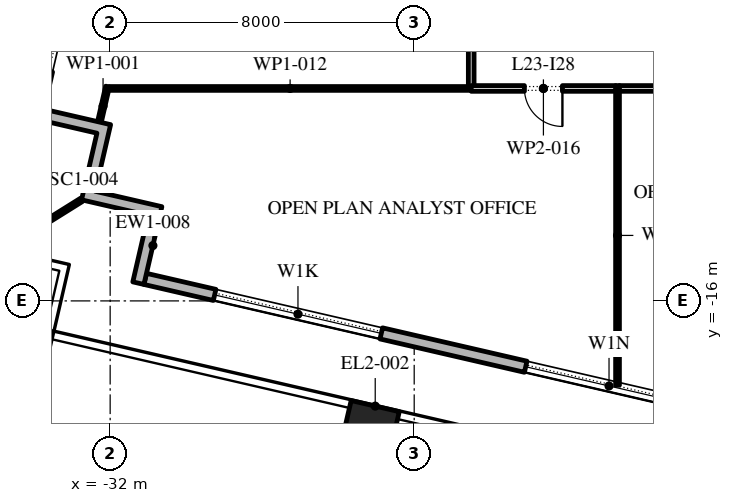
"""IFC4 building model, lengths in metres.
Left out: names, types, materials, properties, quantities, classifications, styles, units other than length and angle.
Written with IfcOpenShell. Run it as: python <this file> out.ifc"""

import sys

from ifc_helpers import new_model, si_unit, direction, frame, frame_2d, origin, origin_2d, place, context, subcontext, project, spatial, polyline, rectangle, outline, extrude, element, fill, save


model = new_model("IFC4")
c1 = context("Model", 3, precision=1e-05, world=origin(), true_north=direction((0.0, 1.0)))
c2 = subcontext(c1, "Body", "Model", "MODEL_VIEW")
j1 = project(units=[si_unit("LENGTHUNIT", "METRE"), si_unit("PLANEANGLEUNIT", "RADIAN")], contexts=[c1])
p1 = place(None, origin())
s1 = spatial("IfcSite", under=j1, at=p1, CompositionType="ELEMENT")
p2 = place(p1, origin())
s2 = spatial("IfcBuilding", under=s1, at=p2, CompositionType="ELEMENT")
p3 = place(p2, frame((0.0, 0.0, 109.8)))
s3 = spatial("IfcBuildingStorey", under=s2, at=p3, CompositionType="ELEMENT", Elevation=109.8)
for number, where, z_axis, x_axis in (
    (1, (-34.282, -17.298, 0.0), (0.0, 0.0, 1.0), (0.974, -0.225, 0.0)),
    (2, (-25.172, -19.402, 0.0), (0.0, 0.0, 1.0), (0.974, -0.225, 0.0)),
):
    element("IfcColumn", number, at=place(p3, frame(where, z_axis=z_axis, x_axis=x_axis)), inside=s3, PredefinedType="COLUMN", context=c2, shape_type="SweptSolid", body=[
        extrude(rectangle(XDim=1.3, YDim=1.3, at=origin_2d()), origin(), (0.0, 0.0, 1.0), 4.2),
    ])
p4 = place(p3, frame((-31.078, -15.421, 0.0), z_axis=(0.0, 0.0, 1.0), x_axis=(0.974370456532, -0.224949357493, 0.0)))
e3 = element("IfcWall", 3, at=p4, inside=s3, PredefinedType="STANDARD", context=c2, shape_type="SweptSolid", body=[
    extrude(rectangle(XDim=51.0, YDim=0.3, at=frame_2d((25.5, 0.0))), origin(), (0.0, 0.0, 1.0), 4.0),
])
p5 = place(p4, frame((1.875, 0.0, 0.45)))
e4 = element("IfcOpeningElement", 4, at=p5, cuts=e3, PredefinedType="OPENING", context=c2, shape_type="SweptSolid", body=[
    extrude(rectangle(XDim=4.5, YDim=2.65, at=frame_2d((2.25, 1.325))), frame((0.0, 0.16, 0.0), z_axis=(0.0, -1.0, 0.0), x_axis=(1.0, 0.0, 0.0)), (0.0, 0.0, 1.0), 0.32),
])
p6 = place(p4, frame((10.275, 0.0, 0.45)))
e5 = element("IfcOpeningElement", 5, at=p6, cuts=e3, PredefinedType="OPENING", context=c2, shape_type="SweptSolid", body=[
    extrude(rectangle(XDim=4.5, YDim=2.525, at=frame_2d((2.25, 1.262))), frame((0.0, 0.16, 0.0), z_axis=(0.0, -1.0, 0.0), x_axis=(1.0, 0.0, 0.0)), (0.0, 0.0, 1.0), 0.32),
])
p7 = place(p4, frame((18.825, 0.0, 0.45)))
e6 = element("IfcOpeningElement", 6, at=p7, cuts=e3, PredefinedType="OPENING", context=c2, shape_type="SweptSolid", body=[
    extrude(rectangle(XDim=4.5, YDim=2.5, at=frame_2d((2.25, 1.25))), frame((0.0, 0.16, 0.0), z_axis=(0.0, -1.0, 0.0), x_axis=(1.0, 0.0, 0.0)), (0.0, 0.0, 1.0), 0.32),
])
p8 = place(p4, frame((27.075, 0.0, 0.0)))
e7 = element("IfcOpeningElement", 7, at=p8, cuts=e3, PredefinedType="OPENING", context=c2, shape_type="SweptSolid", body=[
    extrude(rectangle(XDim=2.4, YDim=2.9, at=frame_2d((1.2, 1.45))), frame((0.0, 0.16, 0.0), z_axis=(0.0, -1.0, 0.0), x_axis=(1.0, 0.0, 0.0)), (0.0, 0.0, 1.0), 0.32),
])
p9 = place(p4, frame((35.925, 0.0, 0.45)))
e8 = element("IfcOpeningElement", 8, at=p9, cuts=e3, PredefinedType="OPENING", context=c2, shape_type="SweptSolid", body=[
    extrude(rectangle(XDim=4.5, YDim=2.45, at=frame_2d((2.25, 1.225))), frame((0.0, 0.16, 0.0), z_axis=(0.0, -1.0, 0.0), x_axis=(1.0, 0.0, 0.0)), (0.0, 0.0, 1.0), 0.32),
])
p10 = place(p4, frame((44.475, 0.0, 0.45)))
e9 = element("IfcOpeningElement", 9, at=p10, cuts=e3, PredefinedType="OPENING", context=c2, shape_type="SweptSolid", body=[
    extrude(rectangle(XDim=4.5, YDim=2.45, at=frame_2d((2.25, 1.225))), frame((0.0, 0.16, 0.0), z_axis=(0.0, -1.0, 0.0), x_axis=(1.0, 0.0, 0.0)), (0.0, 0.0, 1.0), 0.32),
])
p11 = place(p3, frame((-22.82, 37.016, 0.0), z_axis=(0.0, 0.0, 1.0), x_axis=(-0.224953880882, -0.974369412223, 0.0)))
e10 = element("IfcWall", 10, at=p11, inside=s3, PredefinedType="STANDARD", context=c2, shape_type="SweptSolid", body=[
    extrude(rectangle(XDim=49.5, YDim=0.3, at=frame_2d((24.75, 0.0))), origin(), (0.0, 0.0, 1.0), 4.0),
])
p12 = place(p11, frame((1.157, 0.0, 0.45)))
e11 = element("IfcOpeningElement", 11, at=p12, cuts=e10, PredefinedType="OPENING", context=c2, shape_type="SweptSolid", body=[
    extrude(rectangle(XDim=4.5, YDim=3.05, at=frame_2d((2.25, 1.525))), frame((0.0, 0.16, 0.0), z_axis=(0.0, -1.0, 0.0), x_axis=(1.0, 0.0, 0.0)), (0.0, 0.0, 1.0), 0.32),
])
p13 = place(p11, frame((8.121, 0.0, 0.45)))
e12 = element("IfcOpeningElement", 12, at=p13, cuts=e10, PredefinedType="OPENING", context=c2, shape_type="SweptSolid", body=[
    extrude(rectangle(XDim=4.5, YDim=3.05, at=frame_2d((2.25, 1.525))), frame((0.0, 0.16, 0.0), z_axis=(0.0, -1.0, 0.0), x_axis=(1.0, 0.0, 0.0)), (0.0, 0.0, 1.0), 0.32),
])
p14 = place(p11, frame((15.236, 0.0, 0.45)))
e13 = element("IfcOpeningElement", 13, at=p14, cuts=e10, PredefinedType="OPENING", context=c2, shape_type="SweptSolid", body=[
    extrude(rectangle(XDim=4.5, YDim=3.05, at=frame_2d((2.25, 1.525))), frame((0.0, 0.16, 0.0), z_axis=(0.0, -1.0, 0.0), x_axis=(1.0, 0.0, 0.0)), (0.0, 0.0, 1.0), 0.32),
])
p15 = place(p11, frame((23.4, 0.0, 0.0)))
e14 = element("IfcOpeningElement", 14, at=p15, cuts=e10, PredefinedType="OPENING", context=c2, shape_type="SweptSolid", body=[
    extrude(rectangle(XDim=2.4, YDim=3.5, at=frame_2d((1.2, 1.75))), frame((0.0, 0.16, 0.0), z_axis=(0.0, -1.0, 0.0), x_axis=(1.0, 0.0, 0.0)), (0.0, 0.0, 1.0), 0.32),
])
p16 = place(p11, frame((29.464, 0.0, 0.45)))
e15 = element("IfcOpeningElement", 15, at=p16, cuts=e10, PredefinedType="OPENING", context=c2, shape_type="SweptSolid", body=[
    extrude(rectangle(XDim=4.5, YDim=2.875, at=frame_2d((2.25, 1.438))), frame((0.0, 0.16, 0.0), z_axis=(0.0, -1.0, 0.0), x_axis=(1.0, 0.0, 0.0)), (0.0, 0.0, 1.0), 0.32),
])
p17 = place(p11, frame((36.579, 0.0, 0.45)))
e16 = element("IfcOpeningElement", 16, at=p17, cuts=e10, PredefinedType="OPENING", context=c2, shape_type="SweptSolid", body=[
    extrude(rectangle(XDim=4.5, YDim=2.675, at=frame_2d((2.25, 1.337))), frame((0.0, 0.16, 0.0), z_axis=(0.0, -1.0, 0.0), x_axis=(1.0, 0.0, 0.0)), (0.0, 0.0, 1.0), 0.32),
])
p18 = place(p11, frame((43.693, 0.0, 0.45)))
e17 = element("IfcOpeningElement", 17, at=p18, cuts=e10, PredefinedType="OPENING", context=c2, shape_type="SweptSolid", body=[
    extrude(rectangle(XDim=4.5, YDim=3.05, at=frame_2d((2.25, 1.525))), frame((0.0, 0.16, 0.0), z_axis=(0.0, -1.0, 0.0), x_axis=(1.0, 0.0, 0.0)), (0.0, 0.0, 1.0), 0.32),
])
p19 = place(p3, origin())
e18 = element("IfcWall", 18, at=p19, inside=s3, PredefinedType="STANDARD", context=c2, shape_type="SweptSolid", body=[
    extrude(outline(polyline([(-32.393, -13.116), (-30.639, -13.521), (-31.111, -15.567), (-31.404, -15.5), (-30.999, -13.746), (-32.753, -13.341), (-32.348, -11.587), (-33.809, -11.25), (-33.742, -10.957), (-31.988, -11.362), (-32.393, -13.116)])), origin(), (0.0, 0.0, 1.0), 4.0),
])
p20 = place(p3, frame((-32.753, -13.341, -0.05), z_axis=(0.0, 0.0, 1.0), x_axis=(-0.848059759764, -0.529900598103, 0.0)))
e19 = element("IfcWall", 19, at=p20, inside=s3, PredefinedType="STANDARD", context=c2, shape_type="SweptSolid", body=[
    extrude(rectangle(XDim=2.455, YDim=0.1, at=frame_2d((1.228, 0.0))), origin(), (0.0, 0.0, 1.0), 4.05),
])
p21 = place(p3, frame((-32.069, -10.361, 0.0), z_axis=(0.0, 0.0, 1.0), x_axis=(-0.222987762652, -0.974821243976, 0.0)))
e20 = element("IfcWall", 20, at=p21, inside=s3, PredefinedType="PARTITIONING", context=c2, shape_type="SweptSolid", body=[
    extrude(rectangle(XDim=1.058, YDim=0.1, at=frame_2d((0.529, 0.0))), origin(), (0.0, 0.0, 1.0), 4.0),
])
p22 = place(p3, frame((-22.5, -10.41, 0.0), z_axis=(0.0, 0.0, 1.0), x_axis=(-1.0, 0.0, 0.0)))
e21 = element("IfcWall", 21, at=p22, inside=s3, PredefinedType="PARTITIONING", context=c2, shape_type="SweptSolid", body=[
    extrude(rectangle(XDim=9.53, YDim=0.1, at=frame_2d((4.765, 0.0))), origin(), (0.0, 0.0, 1.0), 4.0),
])
p23 = place(p3, frame((-22.5, -10.36, 0.0), z_axis=(0.0, 0.0, 1.0), x_axis=(0.0, 1.0, 0.0)))
e22 = element("IfcWall", 22, at=p23, inside=s3, PredefinedType="PARTITIONING", context=c2, shape_type="SweptSolid", body=[
    extrude(rectangle(XDim=2.735, YDim=0.15, at=frame_2d((1.368, 0.0))), origin(), (0.0, 0.0, 1.0), 4.0),
])
p24 = place(p3, frame((-18.65, -18.219, 0.0), z_axis=(0.0, 0.0, 1.0), x_axis=(0.0, 1.0, 0.0)))
e23 = element("IfcWall", 23, at=p24, inside=s3, PredefinedType="PARTITIONING", context=c2, shape_type="SweptSolid", body=[
    extrude(rectangle(XDim=7.884, YDim=0.1, at=frame_2d((3.942, 0.0))), origin(), (0.0, 0.0, 1.0), 4.0),
])
p25 = place(p3, frame((-18.7, -10.41, 0.0), z_axis=(0.0, 0.0, 1.0), x_axis=(-1.0, 0.0, 0.0)))
e24 = element("IfcWall", 24, at=p25, inside=s3, PredefinedType="PARTITIONING", context=c2, shape_type="SweptSolid", body=[
    extrude(rectangle(XDim=3.8, YDim=0.15, at=frame_2d((1.9, 0.0))), origin(), (0.0, 0.0, 1.0), 4.0),
])
p26 = place(p25, frame((1.4, 0.0, 0.0)))
e25 = element("IfcOpeningElement", 25, at=p26, cuts=e24, PredefinedType="OPENING", context=c2, shape_type="SweptSolid", body=[
    extrude(rectangle(XDim=1.0, YDim=2.1, at=frame_2d((0.5, 1.05))), frame((0.0, 0.085, 0.0), z_axis=(0.0, -1.0, 0.0), x_axis=(1.0, 0.0, 0.0)), (0.0, 0.0, 1.0), 0.17),
])
p27 = place(p3, frame((-14.72, -10.41, 0.0), z_axis=(0.0, 0.0, 1.0), x_axis=(-1.0, 0.0, 0.0)))
e26 = element("IfcWall", 26, at=p27, inside=s3, PredefinedType="PARTITIONING", context=c2, shape_type="SweptSolid", body=[
    extrude(rectangle(XDim=3.88, YDim=0.15, at=frame_2d((1.94, 0.0))), origin(), (0.0, 0.0, 1.0), 4.0),
])
p28 = place(p27, frame((1.03, 0.0, 0.0)))
e27 = element("IfcOpeningElement", 27, at=p28, cuts=e26, PredefinedType="OPENING", context=c2, shape_type="SweptSolid", body=[
    extrude(rectangle(XDim=1.0, YDim=2.1, at=frame_2d((0.5, 1.05))), frame((0.0, 0.085, 0.0), z_axis=(0.0, -1.0, 0.0), x_axis=(1.0, 0.0, 0.0)), (0.0, 0.0, 1.0), 0.17),
])
p29 = place(p5, origin())
e28 = element("IfcWindow", 28, at=p29, inside=s3, PartitioningType="DOUBLE_PANEL_VERTICAL", PredefinedType="WINDOW", context=c2, shape_type="SweptSolid", body=[
    extrude(rectangle(XDim=4.5, YDim=2.65, at=frame_2d((2.25, 1.325))), frame((0.0, 0.03, 0.0), z_axis=(0.0, -1.0, 0.0), x_axis=(1.0, 0.0, 0.0)), (0.0, 0.0, 1.0), 0.06),
])
fill(e4, e28)
p30 = place(p6, origin())
e29 = element("IfcWindow", 29, at=p30, inside=s3, PartitioningType="DOUBLE_PANEL_VERTICAL", PredefinedType="WINDOW", context=c2, shape_type="SweptSolid", body=[
    extrude(rectangle(XDim=4.5, YDim=2.525, at=frame_2d((2.25, 1.262))), frame((0.0, 0.03, 0.0), z_axis=(0.0, -1.0, 0.0), x_axis=(1.0, 0.0, 0.0)), (0.0, 0.0, 1.0), 0.06),
])
fill(e5, e29)
p31 = place(p18, origin())
e30 = element("IfcWindow", 30, at=p31, inside=s3, PartitioningType="DOUBLE_PANEL_VERTICAL", PredefinedType="WINDOW", context=c2, shape_type="SweptSolid", body=[
    extrude(rectangle(XDim=4.5, YDim=3.05, at=frame_2d((2.25, 1.525))), frame((0.0, 0.03, 0.0), z_axis=(0.0, -1.0, 0.0), x_axis=(1.0, 0.0, 0.0)), (0.0, 0.0, 1.0), 0.06),
])
fill(e17, e30)
p32 = place(p26, origin())
e31 = element("IfcDoor", 31, at=p32, inside=s3, OperationType="SINGLE_SWING_RIGHT", PredefinedType="DOOR", context=c2, shape_type="SweptSolid", body=[
    extrude(rectangle(XDim=1.0, YDim=2.1, at=frame_2d((0.5, 1.05))), frame((0.0, 0.025, 0.0), z_axis=(0.0, -1.0, 0.0), x_axis=(1.0, 0.0, 0.0)), (0.0, 0.0, 1.0), 0.05),
])
fill(e25, e31)
save(model, sys.argv[1])
